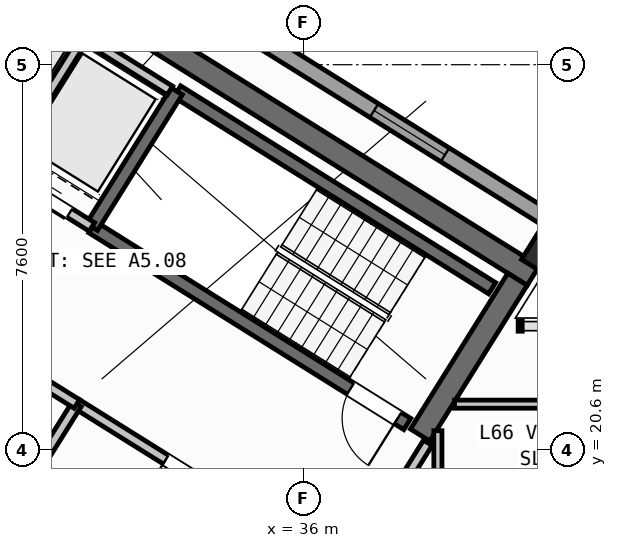
"""IFC4 building model, lengths in metres.
Left out: names, types, materials, properties, quantities, classifications, styles, units other than length and angle.
Written with IfcOpenShell. Run it as: python <this file> out.ifc"""

import sys

from ifc_helpers import new_model, si_unit, direction, frame, frame_2d, origin, origin_2d, place, context, subcontext, project, spatial, rectangle, hollow_rectangle, extrude, source, transform, mapped, element, fill, save


model = new_model("IFC4")
c1 = context("Model", 3, precision=1e-05, world=origin(), true_north=direction((0.0, 1.0)))
c2 = subcontext(c1, "Body", "Model", "MODEL_VIEW")
j1 = project(units=[si_unit("LENGTHUNIT", "METRE"), si_unit("PLANEANGLEUNIT", "RADIAN")], contexts=[c1])
p1 = place(None, origin())
s1 = spatial("IfcSite", under=j1, at=p1, CompositionType="ELEMENT")
p2 = place(p1, origin())
s2 = spatial("IfcBuilding", under=s1, at=p2, CompositionType="ELEMENT")
p3 = place(p2, frame((0.0, 0.0, 262.8)))
s3 = spatial("IfcBuildingStorey", under=s2, at=p3, CompositionType="ELEMENT", Elevation=262.8)
p4 = place(p3, frame((40.531, 24.036, 0.0), z_axis=(0.0, 0.0, 1.0), x_axis=(-0.848048787466, 0.529918157905, 0.0)))
e1 = element("IfcWall", 1, at=p4, inside=s3, PredefinedType="SHEAR", context=c2, shape_type="SweptSolid", body=[
    extrude(rectangle(XDim=13.04, YDim=0.45, at=frame_2d((6.52, 0.0))), origin(), (0.0, 0.0, 1.0), 3.35),
])
p5 = place(p3, frame((40.221, 23.965, 0.0), z_axis=(0.0, 0.0, 1.0), x_axis=(-0.529902075036, -0.848058836916, 0.0)))
e2 = element("IfcWall", 2, at=p5, inside=s3, PredefinedType="SHEAR", context=c2, shape_type="SweptSolid", body=[
    extrude(rectangle(XDim=3.625, YDim=0.45, at=frame_2d((1.812, 0.0))), origin(), (0.0, 0.0, 1.0), 3.35),
])
m1 = source(origin(), c2, "Body", "SweptSolid", [
    extrude(hollow_rectangle(XDim=0.7, YDim=0.7, WallThickness=0.028, at=origin_2d()), origin(), (0.0, 0.0, 1.0), 3.6),
])
p6 = place(p3, frame((40.783, 24.469, 0.0), z_axis=(0.0, 0.0, 1.0), x_axis=(-0.848048096156, 0.529919264233, 0.0)))
e3 = element("IfcColumn", 3, at=p6, inside=s3, PredefinedType="COLUMN", context=c2, shape_type="MappedRepresentation", body=[
    mapped(m1, transform((0.0, 0.0, 0.0), scale=1.0)),
])
p7 = place(p3, frame((14.138, 41.825, 0.0), z_axis=(0.0, 0.0, 1.0), x_axis=(0.848046498049, -0.529921821731, 0.0)))
e4 = element("IfcWall", 4, at=p7, inside=s3, PredefinedType="STANDARD", context=c2, shape_type="SweptSolid", body=[
    extrude(rectangle(XDim=31.588, YDim=0.32, at=frame_2d((15.794, 0.0))), origin(), (0.0, 0.0, 1.0), 3.35),
])
p8 = place(p7, frame((3.568, 0.0, 0.0)))
e5 = element("IfcOpeningElement", 5, at=p8, cuts=e4, PredefinedType="OPENING", context=c2, shape_type="SweptSolid", body=[
    extrude(rectangle(XDim=1.05, YDim=2.15, at=frame_2d((0.525, 1.075))), frame((0.0, 0.17, 0.0), z_axis=(0.0, -1.0, 0.0), x_axis=(1.0, 0.0, 0.0)), (0.0, 0.0, 1.0), 0.34),
])
p9 = place(p7, frame((1.046, 0.0, 0.9)))
e6 = element("IfcOpeningElement", 6, at=p9, cuts=e4, PredefinedType="OPENING", context=c2, shape_type="SweptSolid", body=[
    extrude(rectangle(XDim=1.65, YDim=1.45, at=frame_2d((0.825, 0.725))), frame((0.0, 0.17, 0.0), z_axis=(0.0, -1.0, 0.0), x_axis=(1.0, 0.0, 0.0)), (0.0, 0.0, 1.0), 0.34),
])
p10 = place(p7, frame((8.61, 0.0, 0.9)))
e7 = element("IfcOpeningElement", 7, at=p10, cuts=e4, PredefinedType="OPENING", context=c2, shape_type="SweptSolid", body=[
    extrude(rectangle(XDim=1.35, YDim=1.45, at=frame_2d((0.675, 0.725))), frame((0.0, 0.17, 0.0), z_axis=(0.0, -1.0, 0.0), x_axis=(1.0, 0.0, 0.0)), (0.0, 0.0, 1.0), 0.34),
])
p11 = place(p7, frame((13.599, 0.0, 0.95)))
e8 = element("IfcOpeningElement", 8, at=p11, cuts=e4, PredefinedType="OPENING", context=c2, shape_type="SweptSolid", body=[
    extrude(rectangle(XDim=1.95, YDim=1.35, at=frame_2d((0.975, 0.675))), frame((0.0, 0.17, 0.0), z_axis=(0.0, -1.0, 0.0), x_axis=(1.0, 0.0, 0.0)), (0.0, 0.0, 1.0), 0.34),
])
p12 = place(p7, frame((17.154, 0.0, 1.0)))
e9 = element("IfcOpeningElement", 9, at=p12, cuts=e4, PredefinedType="OPENING", context=c2, shape_type="SweptSolid", body=[
    extrude(rectangle(XDim=0.9, YDim=1.25, at=frame_2d((0.45, 0.625))), frame((0.0, 0.17, 0.0), z_axis=(0.0, -1.0, 0.0), x_axis=(1.0, 0.0, 0.0)), (0.0, 0.0, 1.0), 0.34),
])
p13 = place(p7, frame((21.719, 0.0, 0.9)))
e10 = element("IfcOpeningElement", 10, at=p13, cuts=e4, PredefinedType="OPENING", context=c2, shape_type="SweptSolid", body=[
    extrude(rectangle(XDim=1.65, YDim=1.45, at=frame_2d((0.825, 0.725))), frame((0.0, 0.17, 0.0), z_axis=(0.0, -1.0, 0.0), x_axis=(1.0, 0.0, 0.0)), (0.0, 0.0, 1.0), 0.34),
])
p14 = place(p7, frame((27.419, 0.0, 0.9)))
e11 = element("IfcOpeningElement", 11, at=p14, cuts=e4, PredefinedType="OPENING", context=c2, shape_type="SweptSolid", body=[
    extrude(rectangle(XDim=1.65, YDim=1.45, at=frame_2d((0.825, 0.725))), frame((0.0, 0.17, 0.0), z_axis=(0.0, -1.0, 0.0), x_axis=(1.0, 0.0, 0.0)), (0.0, 0.0, 1.0), 0.34),
])
p15 = place(p3, frame((31.28, 18.261, 0.0), z_axis=(0.0, 0.0, 1.0), x_axis=(-0.848051618787, 0.529913626805, 0.0)))
e12 = element("IfcWall", 12, at=p15, inside=s3, PredefinedType="SHEAR", context=c2, shape_type="SweptSolid", body=[
    extrude(rectangle(XDim=7.46, YDim=0.26, at=frame_2d((3.73, 0.0))), origin(), (0.0, 0.0, 1.0), 3.35),
])
p16 = place(p15, frame((0.36, 0.0, 0.0)))
e13 = element("IfcOpeningElement", 13, at=p16, cuts=e12, PredefinedType="OPENING", context=c2, shape_type="SweptSolid", body=[
    extrude(rectangle(XDim=0.86, YDim=2.05, at=frame_2d((0.43, 1.025))), frame((0.0, 0.14, 0.0), z_axis=(0.0, -1.0, 0.0), x_axis=(1.0, 0.0, 0.0)), (0.0, 0.0, 1.0), 0.28),
])
p17 = place(p3, frame((39.721, 23.788, 0.0), z_axis=(0.0, 0.0, 1.0), x_axis=(-0.848054434086, 0.529909121291, 0.0)))
e14 = element("IfcWall", 14, at=p17, inside=s3, PredefinedType="SHEAR", context=c2, shape_type="SweptSolid", body=[
    extrude(rectangle(XDim=7.33, YDim=0.26, at=frame_2d((3.665, 0.0))), origin(), (0.0, 0.0, 1.0), 3.35),
])
p18 = place(p3, frame((38.046, 21.108, 0.0), z_axis=(0.0, 0.0, 1.0), x_axis=(-0.848054434086, 0.529909121291, 0.0)))
e15 = element("IfcWall", 15, at=p18, inside=s3, PredefinedType="SHEAR", context=c2, shape_type="SweptSolid", body=[
    extrude(rectangle(XDim=7.33, YDim=0.26, at=frame_2d((3.665, 0.0))), origin(), (0.0, 0.0, 1.0), 3.35),
])
p19 = place(p18, frame((0.22, 0.0, 0.0)))
e16 = element("IfcOpeningElement", 16, at=p19, cuts=e15, PredefinedType="OPENING", context=c2, shape_type="SweptSolid", body=[
    extrude(rectangle(XDim=1.1, YDim=2.1, at=frame_2d((0.55, 1.05))), frame((0.0, 0.14, 0.0), z_axis=(0.0, -1.0, 0.0), x_axis=(1.0, 0.0, 0.0)), (0.0, 0.0, 1.0), 0.28),
])
p20 = place(p3, frame((33.496, 27.677, 0.0), z_axis=(0.0, 0.0, 1.0), x_axis=(-0.529908658664, -0.84805472316, 0.0)))
e17 = element("IfcWall", 17, at=p20, inside=s3, PredefinedType="SHEAR", context=c2, shape_type="SweptSolid", body=[
    extrude(rectangle(XDim=3.16, YDim=0.26, at=frame_2d((1.58, 0.0))), origin(), (0.0, 0.0, 1.0), 3.35),
])
p21 = place(p3, frame((36.459, 18.421, 0.0), z_axis=(0.0, 0.0, 1.0), x_axis=(-0.848059591691, 0.529900867089, 0.0)))
e18 = element("IfcWall", 18, at=p21, inside=s3, PredefinedType="STANDARD", context=c2, shape_type="SweptSolid", body=[
    extrude(rectangle(XDim=5.818, YDim=0.2, at=frame_2d((2.909, 0.0))), origin(), (0.0, 0.0, 1.0), 3.34),
])
p22 = place(p21, frame((2.598, 0.0, 0.0)))
e19 = element("IfcOpeningElement", 19, at=p22, cuts=e18, PredefinedType="OPENING", context=c2, shape_type="SweptSolid", body=[
    extrude(rectangle(XDim=1.15, YDim=2.1, at=frame_2d((0.575, 1.05))), frame((0.0, 0.11, 0.0), z_axis=(0.0, -1.0, 0.0), x_axis=(1.0, 0.0, 0.0)), (0.0, 0.0, 1.0), 0.22),
])
p23 = place(p3, frame((31.822, 24.998, 0.0), z_axis=(0.0, 0.0, 1.0), x_axis=(-0.848054125777, 0.529909614701, 0.0)))
e20 = element("IfcWall", 20, at=p23, inside=s3, PredefinedType="STANDARD", context=c2, shape_type="SweptSolid", body=[
    extrude(rectangle(XDim=4.668, YDim=0.2, at=frame_2d((2.334, 0.0))), origin(), (0.0, 0.0, 1.0), 3.34),
])
p24 = place(p23, frame((0.52, 0.0, 0.0)))
e21 = element("IfcOpeningElement", 21, at=p24, cuts=e20, PredefinedType="OPENING", context=c2, shape_type="SweptSolid", body=[
    extrude(rectangle(XDim=1.2, YDim=2.15, at=frame_2d((0.6, 1.075))), frame((0.0, 0.11, 0.0), z_axis=(0.0, -1.0, 0.0), x_axis=(1.0, 0.0, 0.0)), (0.0, 0.0, 1.0), 0.22),
])
p25 = place(p23, frame((2.54, 0.0, 0.0)))
e22 = element("IfcOpeningElement", 22, at=p25, cuts=e20, PredefinedType="OPENING", context=c2, shape_type="SweptSolid", body=[
    extrude(rectangle(XDim=1.2, YDim=2.15, at=frame_2d((0.6, 1.075))), frame((0.0, 0.11, 0.0), z_axis=(0.0, -1.0, 0.0), x_axis=(1.0, 0.0, 0.0)), (0.0, 0.0, 1.0), 0.22),
])
p26 = place(p3, frame((31.645, 28.716, 0.0), z_axis=(0.0, 0.0, 1.0), x_axis=(-0.52986693015, -0.848080795876, 0.0)))
e23 = element("IfcWall", 23, at=p26, inside=s3, PredefinedType="STANDARD", context=c2, shape_type="SweptSolid", body=[
    extrude(rectangle(XDim=2.66, YDim=0.2, at=frame_2d((1.33, 0.0))), origin(), (0.0, 0.0, 1.0), 3.34),
])
p27 = place(p3, frame((33.363, 27.69, 0.0), z_axis=(0.0, 0.0, 1.0), x_axis=(-0.84804957148, 0.529916903215, 0.0)))
e24 = element("IfcWall", 24, at=p27, inside=s3, PredefinedType="STANDARD", context=c2, shape_type="SweptSolid", body=[
    extrude(rectangle(XDim=4.548, YDim=0.2, at=frame_2d((2.274, 0.0))), origin(), (0.0, 0.0, 1.0), 3.34),
])
p28 = place(p3, frame((31.525, 21.504, 0.0), z_axis=(0.0, 0.0, 1.0), x_axis=(-0.529907497854, -0.848055448493, 0.0)))
e25 = element("IfcWall", 25, at=p28, inside=s3, PredefinedType="STANDARD", context=c2, shape_type="SweptSolid", body=[
    extrude(rectangle(XDim=2.88, YDim=0.2, at=frame_2d((1.44, 0.0))), origin(), (0.0, 0.0, 1.0), 3.34),
])
p29 = place(p3, frame((31.525, 21.504, 0.0), z_axis=(0.0, 0.0, 1.0), x_axis=(-0.848042066329, 0.529928913853, 0.0)))
e26 = element("IfcWall", 26, at=p29, inside=s3, PredefinedType="STANDARD", context=c2, shape_type="SweptSolid", body=[
    extrude(rectangle(XDim=6.268, YDim=0.2, at=frame_2d((3.134, 0.0))), origin(), (0.0, 0.0, 1.0), 3.34),
])
p30 = place(p29, frame((4.4, 0.0, 0.0)))
e27 = element("IfcOpeningElement", 27, at=p30, cuts=e26, PredefinedType="OPENING", context=c2, shape_type="SweptSolid", body=[
    extrude(rectangle(XDim=0.86, YDim=2.05, at=frame_2d((0.43, 1.025))), frame((0.0, 0.11, 0.0), z_axis=(0.0, -1.0, 0.0), x_axis=(1.0, 0.0, 0.0)), (0.0, 0.0, 1.0), 0.22),
])
p31 = place(p29, frame((1.45, 0.0, 0.0)))
e28 = element("IfcOpeningElement", 28, at=p31, cuts=e26, PredefinedType="OPENING", context=c2, shape_type="SweptSolid", body=[
    extrude(rectangle(XDim=0.86, YDim=2.05, at=frame_2d((0.43, 1.025))), frame((0.0, 0.11, 0.0), z_axis=(0.0, -1.0, 0.0), x_axis=(1.0, 0.0, 0.0)), (0.0, 0.0, 1.0), 0.22),
])
p32 = place(p3, frame((38.451, 20.737, 0.0), z_axis=(0.0, 0.0, 1.0), x_axis=(-0.529924799939, -0.848044637038, 0.0)))
e29 = element("IfcWall", 29, at=p32, inside=s3, PredefinedType="STANDARD", context=c2, shape_type="SweptSolid", body=[
    extrude(rectangle(XDim=2.96, YDim=0.2, at=frame_2d((1.48, 0.0))), origin(), (0.0, 0.0, 1.0), 3.34),
])
p33 = place(p32, frame((1.46, 0.0, 0.0)))
e30 = element("IfcOpeningElement", 30, at=p33, cuts=e29, PredefinedType="OPENING", context=c2, shape_type="SweptSolid", body=[
    extrude(rectangle(XDim=0.86, YDim=2.05, at=frame_2d((0.43, 1.025))), frame((0.0, 0.11, 0.0), z_axis=(0.0, -1.0, 0.0), x_axis=(1.0, 0.0, 0.0)), (0.0, 0.0, 1.0), 0.22),
])
p34 = place(p3, frame((38.65, 17.93, 0.0), z_axis=(0.0, 0.0, 1.0), x_axis=(0.0, 1.0, 0.0)))
e31 = element("IfcWall", 31, at=p34, inside=s3, PredefinedType="PARTITIONING", context=c2, shape_type="SweptSolid", body=[
    extrude(rectangle(XDim=3.046, YDim=0.16, at=frame_2d((1.523, 0.0))), origin(), (0.0, 0.0, 1.0), 3.34),
])
p35 = place(p3, frame((38.978, 21.5, 0.0), z_axis=(0.0, 0.0, 1.0), x_axis=(1.0, 0.0, 0.0)))
e32 = element("IfcWall", 32, at=p35, inside=s3, PredefinedType="PARTITIONING", context=c2, shape_type="SweptSolid", body=[
    extrude(rectangle(XDim=3.823, YDim=0.16, at=frame_2d((1.911, 0.0))), origin(), (0.0, 0.0, 1.0), 3.34),
])
m2 = source(origin(), c2, "Body", "SweptSolid", [
    extrude(rectangle(XDim=1.65, YDim=1.45, at=frame_2d((0.825, 0.725))), frame((0.0, 0.03, 0.0), z_axis=(0.0, -1.0, 0.0), x_axis=(1.0, 0.0, 0.0)), (0.0, 0.0, 1.0), 0.06),
])
p36 = place(p14, origin())
e33 = element("IfcWindow", 33, at=p36, inside=s3, PartitioningType="SINGLE_PANEL", PredefinedType="WINDOW", context=c2, shape_type="MappedRepresentation", body=[
    mapped(m2, transform((0.0, 0.0, 0.0), scale=1.0)),
])
fill(e11, e33)
m3 = source(origin(), c2, "Body", "SweptSolid", [
    extrude(rectangle(XDim=1.1, YDim=2.1, at=frame_2d((0.55, 1.05))), frame((0.0, 0.025, 0.0), z_axis=(0.0, -1.0, 0.0), x_axis=(1.0, 0.0, 0.0)), (0.0, 0.0, 1.0), 0.05),
])
p37 = place(p19, origin())
e34 = element("IfcDoor", 34, at=p37, inside=s3, OperationType="SINGLE_SWING_LEFT", PredefinedType="DOOR", context=c2, shape_type="MappedRepresentation", body=[
    mapped(m3, transform((0.0, 0.0, 0.0), scale=1.0)),
])
fill(e16, e34)
m4 = source(origin(), c2, "Body", "SweptSolid", [
    extrude(rectangle(XDim=1.15, YDim=2.1, at=frame_2d((0.575, 1.05))), frame((0.0, 0.025, 0.0), z_axis=(0.0, -1.0, 0.0), x_axis=(1.0, 0.0, 0.0)), (0.0, 0.0, 1.0), 0.05),
])
p38 = place(p22, origin())
e35 = element("IfcDoor", 35, at=p38, inside=s3, OperationType="SINGLE_SWING_RIGHT", PredefinedType="DOOR", context=c2, shape_type="MappedRepresentation", body=[
    mapped(m4, transform((0.0, 0.0, 0.0), scale=1.0)),
])
fill(e19, e35)
m5 = source(origin(), c2, "Body", "SweptSolid", [
    extrude(rectangle(XDim=1.2, YDim=2.15, at=frame_2d((0.6, 1.075))), frame((0.0, 0.025, 0.0), z_axis=(0.0, -1.0, 0.0), x_axis=(1.0, 0.0, 0.0)), (0.0, 0.0, 1.0), 0.05),
])
p39 = place(p24, origin())
e36 = element("IfcDoor", 36, at=p39, inside=s3, OperationType="DOUBLE_DOOR_SLIDING", PredefinedType="DOOR", context=c2, shape_type="MappedRepresentation", body=[
    mapped(m5, transform((0.0, 0.0, 0.0), scale=1.0)),
])
fill(e21, e36)
save(model, sys.argv[1])
